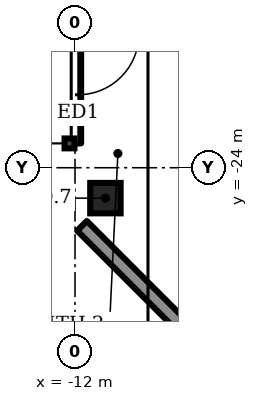
"""IFC4 building model, lengths in metres.
Left out: names, types, materials, properties, quantities, classifications, styles, units other than length and angle.
Written with IfcOpenShell. Run it as: python <this file> out.ifc"""

import sys

from ifc_helpers import new_model, si_unit, direction, frame, frame_2d, origin, origin_2d, place, context, subcontext, project, spatial, rectangle, hollow_circle, extrude, element, fill, save


model = new_model("IFC4")
c1 = context("Model", 3, precision=1e-05, world=origin(), true_north=direction((0.0, 1.0)))
c2 = subcontext(c1, "Body", "Model", "MODEL_VIEW")
j1 = project(units=[si_unit("LENGTHUNIT", "METRE"), si_unit("PLANEANGLEUNIT", "RADIAN")], contexts=[c1])
p1 = place(None, origin())
s1 = spatial("IfcSite", under=j1, at=p1, CompositionType="ELEMENT")
p2 = place(p1, origin())
s2 = spatial("IfcBuilding", under=s1, at=p2, CompositionType="ELEMENT")
p3 = place(p2, origin())
s3 = spatial("IfcBuildingStorey", under=s2, at=p3, CompositionType="ELEMENT", Elevation=0.0)
p4 = place(p3, frame((-11.0, -25.0, 0.0), z_axis=(0.0, 0.0, 1.0), x_axis=(1.0, 0.0, 0.0)))
e1 = element("IfcColumn", 1, at=p4, inside=s3, PredefinedType="COLUMN", context=c2, shape_type="SweptSolid", body=[
    extrude(rectangle(XDim=1.0, YDim=1.0, at=origin_2d()), origin(), (0.0, 0.0, 1.0), 8.0),
])
p5 = place(p3, frame((-11.9, -12.8, 0.0), z_axis=(0.0, 0.0, 1.0), x_axis=(0.0, -1.0, 0.0)))
e2 = element("IfcWall", 2, at=p5, inside=s3, PredefinedType="SOLIDWALL", context=c2, shape_type="SweptSolid", body=[
    extrude(rectangle(XDim=10.4, YDim=0.2, at=frame_2d((5.2, 0.0))), origin(), (0.0, 0.0, 1.0), 2.6),
])
p6 = place(p5, frame((1.6, 0.0, 0.0)))
e3 = element("IfcOpeningElement", 3, at=p6, cuts=e2, PredefinedType="OPENING", context=c2, shape_type="SweptSolid", body=[
    extrude(rectangle(XDim=2.0, YDim=2.4, at=frame_2d((1.0, 1.2))), frame((0.0, 0.11, 0.0), z_axis=(0.0, -1.0, 0.0), x_axis=(1.0, 0.0, 0.0)), (0.0, 0.0, 1.0), 0.22),
])
p7 = place(p5, frame((6.8, 0.0, 0.0)))
e4 = element("IfcOpeningElement", 4, at=p7, cuts=e2, PredefinedType="OPENING", context=c2, shape_type="SweptSolid", body=[
    extrude(rectangle(XDim=2.0, YDim=2.4, at=frame_2d((1.0, 1.2))), frame((0.0, 0.11, 0.0), z_axis=(0.0, -1.0, 0.0), x_axis=(1.0, 0.0, 0.0)), (0.0, 0.0, 1.0), 0.22),
])
p8 = place(p3, frame((-11.77, -25.912, 0.0), z_axis=(0.0, 0.0, 1.0), x_axis=(0.707107, -0.707107, 0.0)))
e5 = element("IfcWall", 5, at=p8, inside=s3, PredefinedType="SOLIDWALL", context=c2, shape_type="SweptSolid", body=[
    extrude(rectangle(XDim=8.285, YDim=0.45, at=frame_2d((4.143, 0.0))), origin(), (0.0, 0.0, 1.0), 7.7),
])
p9 = place(p3, frame((-12.182, -23.2, 0.0), z_axis=(0.0, 0.0, 1.0), x_axis=(1.0, 0.0, 0.0)))
e6 = element("IfcColumn", 6, at=p9, inside=s3, PredefinedType="COLUMN", context=c2, shape_type="SweptSolid", body=[
    extrude(hollow_circle(Radius=0.162, WallThickness=0.01, at=origin_2d()), origin(), (0.0, 0.0, 1.0), 3.2),
])
p10 = place(p7, origin())
e7 = element("IfcDoor", 7, at=p10, inside=s3, OperationType="DOUBLE_DOOR_DOUBLE_SWING", PredefinedType="DOOR", context=c2, shape_type="SweptSolid", body=[
    extrude(rectangle(XDim=2.0, YDim=2.4, at=frame_2d((1.0, 1.2))), frame((0.0, 0.025, 0.0), z_axis=(0.0, -1.0, 0.0), x_axis=(1.0, 0.0, 0.0)), (0.0, 0.0, 1.0), 0.05),
])
fill(e4, e7)
save(model, sys.argv[1])
